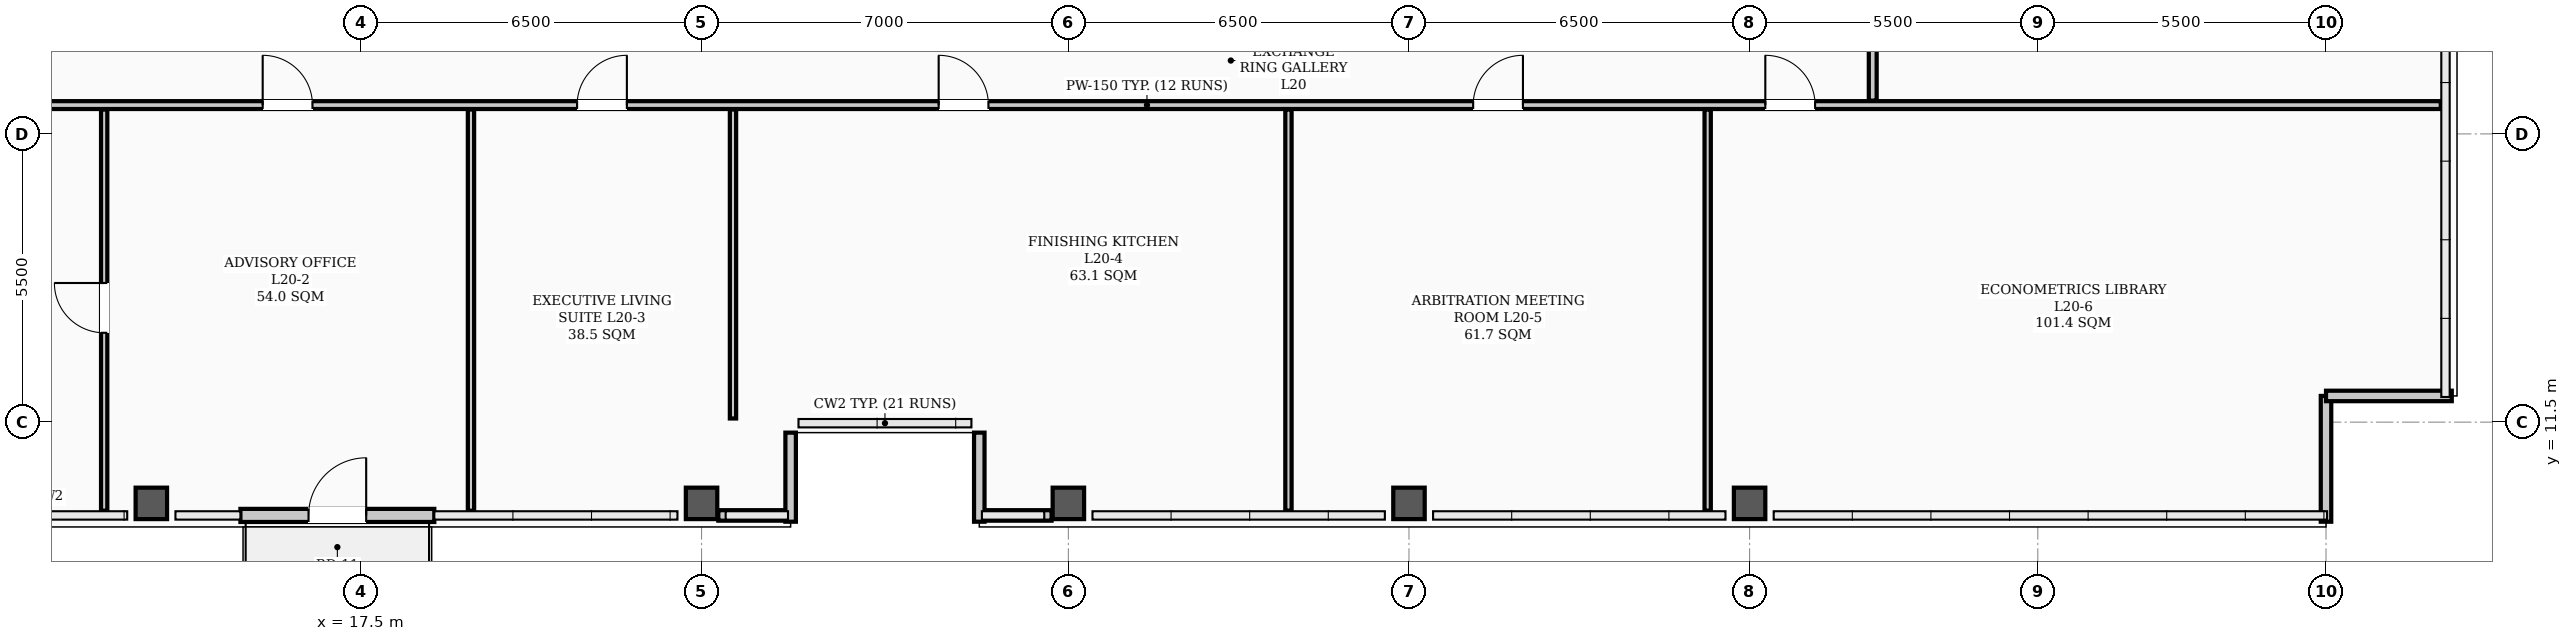
"""IFC4 building model, lengths in metres.
Left out: names, types, materials, properties, quantities, classifications, styles, units other than length and angle.
Written with IfcOpenShell. Run it as: python <this file> out.ifc"""

import sys

from ifc_helpers import new_model, si_unit, direction, frame, frame_2d, origin, origin_2d, place, context, subcontext, project, spatial, rectangle, hollow_rectangle, extrude, element, fill, save


model = new_model("IFC4")
c1 = context("Model", 3, precision=1e-05, world=origin(), true_north=direction((0.0, 1.0)))
c2 = subcontext(c1, "Body", "Model", "MODEL_VIEW")
j1 = project(units=[si_unit("LENGTHUNIT", "METRE"), si_unit("PLANEANGLEUNIT", "RADIAN")], contexts=[c1])
p1 = place(None, origin())
s1 = spatial("IfcSite", under=j1, at=p1, CompositionType="ELEMENT")
p2 = place(p1, origin())
s2 = spatial("IfcBuilding", under=s1, at=p2, CompositionType="ELEMENT")
p3 = place(p2, frame((0.0, 0.0, 81.1)))
s3 = spatial("IfcBuildingStorey", under=s2, at=p3, CompositionType="ELEMENT", Elevation=81.1)
for number, where, z_axis, x_axis in (
    (1, (13.5, 9.95, 0.0), (0.0, 0.0, 1.0), (1.0, 0.0, 0.0)),
    (2, (24.0, 9.95, 0.0), (0.0, 0.0, 1.0), (1.0, 0.0, 0.0)),
    (3, (31.0, 9.95, 0.0), (0.0, 0.0, 1.0), (1.0, 0.0, 0.0)),
    (4, (37.5, 9.95, 0.0), (0.0, 0.0, 1.0), (1.0, 0.0, 0.0)),
    (5, (44.0, 9.95, 0.0), (0.0, 0.0, 1.0), (1.0, 0.0, 0.0)),
):
    element("IfcColumn", number, at=place(p3, frame(where, z_axis=z_axis, x_axis=x_axis)), inside=s3, PredefinedType="COLUMN", context=c2, shape_type="SweptSolid", body=[
        extrude(hollow_rectangle(XDim=0.6, YDim=0.6, WallThickness=0.026, InnerFilletRadius=0.013, OuterFilletRadius=0.039, at=origin_2d()), origin(), (0.0, 0.0, 1.0), 3.9),
    ])
for number, where, z_axis, x_axis in (
    (6, (24.32, 9.72, 0.0), (0.0, 0.0, 1.0), (1.0, 0.0, 0.0)),
    (7, (29.35, 9.72, 0.0), (0.0, 0.0, 1.0), (1.0, 0.0, 0.0)),
):
    element("IfcWall", number, at=place(p3, frame(where, z_axis=z_axis, x_axis=x_axis)), inside=s3, PredefinedType="PARAPET", context=c2, shape_type="SweptSolid", body=[
        extrude(rectangle(XDim=1.33, YDim=0.2, at=frame_2d((0.665, 0.0))), origin(), (0.0, 0.0, 1.0), 1.2),
    ])
for number, where, z_axis, x_axis in (
    (8, (55.0, 9.6, 0.0), (0.0, 0.0, 1.0), (0.0, 1.0, 0.0)),
    (9, (55.0, 12.0, 0.0), (0.0, 0.0, 1.0), (1.0, 0.0, 0.0)),
):
    element("IfcWall", number, at=place(p3, frame(where, z_axis=z_axis, x_axis=x_axis)), inside=s3, PredefinedType="PARAPET", context=c2, shape_type="SweptSolid", body=[
        extrude(rectangle(XDim=2.4, YDim=0.2, at=frame_2d((1.2, 0.0))), origin(), (0.0, 0.0, 1.0), 1.2),
    ])
for number, where, z_axis, x_axis in (
    (10, (25.7, 9.6, 0.0), (0.0, 0.0, 1.0), (0.0, 1.0, 0.0)),
    (11, (29.3, 11.3, 0.0), (0.0, 0.0, 1.0), (0.0, -1.0, 0.0)),
):
    element("IfcWall", number, at=place(p3, frame(where, z_axis=z_axis, x_axis=x_axis)), inside=s3, PredefinedType="PARAPET", context=c2, shape_type="SweptSolid", body=[
        extrude(rectangle(XDim=1.7, YDim=0.2, at=frame_2d((0.85, 0.0))), origin(), (0.0, 0.0, 1.0), 1.2),
    ])
p4 = place(p3, frame((15.2, 9.72, 0.0), z_axis=(0.0, 0.0, 1.0), x_axis=(1.0, 0.0, 0.0)))
e12 = element("IfcWall", 12, at=p4, inside=s3, PredefinedType="STANDARD", context=c2, shape_type="SweptSolid", body=[
    extrude(rectangle(XDim=3.7, YDim=0.25, at=frame_2d((1.85, 0.0))), origin(), (0.0, 0.0, 1.0), 3.18),
])
p5 = place(p4, frame((1.3, 0.0, 0.0)))
e13 = element("IfcOpeningElement", 13, at=p5, cuts=e12, PredefinedType="OPENING", context=c2, shape_type="SweptSolid", body=[
    extrude(rectangle(XDim=1.1, YDim=2.2, at=frame_2d((0.55, 1.1))), frame((0.0, 0.135, 0.0), z_axis=(0.0, -1.0, 0.0), x_axis=(1.0, 0.0, 0.0)), (0.0, 0.0, 1.0), 0.27),
])
p6 = place(p3, frame((7.81, 17.55, 0.0), z_axis=(0.0, 0.0, 1.0), x_axis=(1.0, 0.0, 0.0)))
e14 = element("IfcWall", 14, at=p6, inside=s3, PredefinedType="PARTITIONING", context=c2, shape_type="SweptSolid", body=[
    extrude(rectangle(XDim=49.38, YDim=0.15, at=frame_2d((24.69, 0.0))), origin(), (0.0, 0.0, 1.0), 3.1),
])
p7 = place(p6, frame((7.815, 0.0, 0.0)))
e15 = element("IfcOpeningElement", 15, at=p7, cuts=e14, PredefinedType="OPENING", context=c2, shape_type="SweptSolid", body=[
    extrude(rectangle(XDim=0.95, YDim=2.08, at=frame_2d((0.475, 1.04))), frame((0.0, 0.085, 0.0), z_axis=(0.0, -1.0, 0.0), x_axis=(1.0, 0.0, 0.0)), (0.0, 0.0, 1.0), 0.17),
])
p8 = place(p6, frame((13.815, 0.0, 0.0)))
e16 = element("IfcOpeningElement", 16, at=p8, cuts=e14, PredefinedType="OPENING", context=c2, shape_type="SweptSolid", body=[
    extrude(rectangle(XDim=0.95, YDim=2.08, at=frame_2d((0.475, 1.04))), frame((0.0, 0.085, 0.0), z_axis=(0.0, -1.0, 0.0), x_axis=(1.0, 0.0, 0.0)), (0.0, 0.0, 1.0), 0.17),
])
p9 = place(p6, frame((20.715, 0.0, 0.0)))
e17 = element("IfcOpeningElement", 17, at=p9, cuts=e14, PredefinedType="OPENING", context=c2, shape_type="SweptSolid", body=[
    extrude(rectangle(XDim=0.95, YDim=2.08, at=frame_2d((0.475, 1.04))), frame((0.0, 0.085, 0.0), z_axis=(0.0, -1.0, 0.0), x_axis=(1.0, 0.0, 0.0)), (0.0, 0.0, 1.0), 0.17),
])
p10 = place(p6, frame((30.915, 0.0, 0.0)))
e18 = element("IfcOpeningElement", 18, at=p10, cuts=e14, PredefinedType="OPENING", context=c2, shape_type="SweptSolid", body=[
    extrude(rectangle(XDim=0.95, YDim=2.08, at=frame_2d((0.475, 1.04))), frame((0.0, 0.085, 0.0), z_axis=(0.0, -1.0, 0.0), x_axis=(1.0, 0.0, 0.0)), (0.0, 0.0, 1.0), 0.17),
])
p11 = place(p6, frame((36.49, 0.0, 0.0)))
e19 = element("IfcOpeningElement", 19, at=p11, cuts=e14, PredefinedType="OPENING", context=c2, shape_type="SweptSolid", body=[
    extrude(rectangle(XDim=0.95, YDim=2.08, at=frame_2d((0.475, 1.04))), frame((0.0, 0.085, 0.0), z_axis=(0.0, -1.0, 0.0), x_axis=(1.0, 0.0, 0.0)), (0.0, 0.0, 1.0), 0.17),
])
p12 = place(p3, frame((46.35, 17.635, 0.0), z_axis=(0.0, 0.0, 1.0), x_axis=(0.0, 1.0, 0.0)))
e20 = element("IfcWall", 20, at=p12, inside=s3, PredefinedType="PARTITIONING", context=c2, shape_type="SweptSolid", body=[
    extrude(rectangle(XDim=20.58, YDim=0.15, at=frame_2d((10.29, 0.0))), origin(), (0.0, 0.0, 1.0), 3.0),
])
p13 = place(p12, frame((3.865, 0.0, 0.0)))
e21 = element("IfcOpeningElement", 21, at=p13, cuts=e20, PredefinedType="OPENING", context=c2, shape_type="SweptSolid", body=[
    extrude(rectangle(XDim=0.95, YDim=2.08, at=frame_2d((0.475, 1.04))), frame((0.0, 0.085, 0.0), z_axis=(0.0, -1.0, 0.0), x_axis=(1.0, 0.0, 0.0)), (0.0, 0.0, 1.0), 0.17),
])
p14 = place(p12, frame((9.49, 0.0, 0.0)))
e22 = element("IfcOpeningElement", 22, at=p14, cuts=e20, PredefinedType="OPENING", context=c2, shape_type="SweptSolid", body=[
    extrude(rectangle(XDim=0.95, YDim=2.08, at=frame_2d((0.475, 1.04))), frame((0.0, 0.085, 0.0), z_axis=(0.0, -1.0, 0.0), x_axis=(1.0, 0.0, 0.0)), (0.0, 0.0, 1.0), 0.17),
])
p15 = place(p12, frame((17.44, 0.0, 0.0)))
e23 = element("IfcOpeningElement", 23, at=p15, cuts=e20, PredefinedType="OPENING", context=c2, shape_type="SweptSolid", body=[
    extrude(rectangle(XDim=0.95, YDim=2.08, at=frame_2d((0.475, 1.04))), frame((0.0, 0.085, 0.0), z_axis=(0.0, -1.0, 0.0), x_axis=(1.0, 0.0, 0.0)), (0.0, 0.0, 1.0), 0.17),
])
p16 = place(p3, frame((12.6, 9.81, 0.0), z_axis=(0.0, 0.0, 1.0), x_axis=(0.0, 1.0, 0.0)))
e24 = element("IfcWall", 24, at=p16, inside=s3, PredefinedType="PARTITIONING", context=c2, shape_type="SweptSolid", body=[
    extrude(rectangle(XDim=7.655, YDim=0.12, at=frame_2d((3.828, 0.0))), origin(), (0.0, 0.0, 1.0), 3.72),
])
p17 = place(p16, frame((3.395, 0.0, 0.0)))
e25 = element("IfcOpeningElement", 25, at=p17, cuts=e24, PredefinedType="OPENING", context=c2, shape_type="SweptSolid", body=[
    extrude(rectangle(XDim=0.95, YDim=2.08, at=frame_2d((0.475, 1.04))), frame((0.0, 0.07, 0.0), z_axis=(0.0, -1.0, 0.0), x_axis=(1.0, 0.0, 0.0)), (0.0, 0.0, 1.0), 0.14),
])
p18 = place(p3, frame((19.6, 9.81, 0.0), z_axis=(0.0, 0.0, 1.0), x_axis=(0.0, 1.0, 0.0)))
e26 = element("IfcWall", 26, at=p18, inside=s3, PredefinedType="PARTITIONING", context=c2, shape_type="SweptSolid", body=[
    extrude(rectangle(XDim=7.655, YDim=0.12, at=frame_2d((3.828, 0.0))), origin(), (0.0, 0.0, 1.0), 3.212),
])
p19 = place(p3, frame((24.6, 11.57, 0.0), z_axis=(0.0, 0.0, 1.0), x_axis=(0.0, 1.0, 0.0)))
e27 = element("IfcWall", 27, at=p19, inside=s3, PredefinedType="PARTITIONING", context=c2, shape_type="SweptSolid", body=[
    extrude(rectangle(XDim=5.895, YDim=0.12, at=frame_2d((2.948, 0.0))), origin(), (0.0, 0.0, 1.0), 3.1),
])
for number, where, z_axis, x_axis in (
    (28, (35.2, 9.81, 0.0), (0.0, 0.0, 1.0), (0.0, 1.0, 0.0)),
    (29, (43.2, 9.81, 0.0), (0.0, 0.0, 1.0), (0.0, 1.0, 0.0)),
):
    element("IfcWall", number, at=place(p3, frame(where, z_axis=z_axis, x_axis=x_axis)), inside=s3, PredefinedType="PARTITIONING", context=c2, shape_type="SweptSolid", body=[
        extrude(rectangle(XDim=7.655, YDim=0.12, at=frame_2d((3.828, 0.0))), origin(), (0.0, 0.0, 1.0), 3.212),
    ])
p20 = place(p5, origin())
e30 = element("IfcDoor", 30, at=p20, inside=s3, OperationType="SINGLE_SWING_RIGHT", PredefinedType="DOOR", context=c2, shape_type="SweptSolid", body=[
    extrude(rectangle(XDim=1.1, YDim=2.2, at=frame_2d((0.55, 1.1))), frame((0.0, 0.025, 0.0), z_axis=(0.0, -1.0, 0.0), x_axis=(1.0, 0.0, 0.0)), (0.0, 0.0, 1.0), 0.05),
])
fill(e13, e30)
p21 = place(p17, origin())
e31 = element("IfcDoor", 31, at=p21, inside=s3, OperationType="SINGLE_SWING_RIGHT", PredefinedType="DOOR", context=c2, shape_type="SweptSolid", body=[
    extrude(rectangle(XDim=0.95, YDim=2.08, at=frame_2d((0.475, 1.04))), frame((0.0, 0.025, 0.0), z_axis=(0.0, -1.0, 0.0), x_axis=(1.0, 0.0, 0.0)), (0.0, 0.0, 1.0), 0.05),
])
fill(e25, e31)
p22 = place(p7, origin())
e32 = element("IfcDoor", 32, at=p22, inside=s3, OperationType="SINGLE_SWING_LEFT", PredefinedType="DOOR", context=c2, shape_type="SweptSolid", body=[
    extrude(rectangle(XDim=0.95, YDim=2.08, at=frame_2d((0.475, 1.04))), frame((0.0, 0.025, 0.0), z_axis=(0.0, -1.0, 0.0), x_axis=(1.0, 0.0, 0.0)), (0.0, 0.0, 1.0), 0.05),
])
fill(e15, e32)
p23 = place(p8, origin())
e33 = element("IfcDoor", 33, at=p23, inside=s3, OperationType="SINGLE_SWING_RIGHT", PredefinedType="DOOR", context=c2, shape_type="SweptSolid", body=[
    extrude(rectangle(XDim=0.95, YDim=2.08, at=frame_2d((0.475, 1.04))), frame((0.0, 0.025, 0.0), z_axis=(0.0, -1.0, 0.0), x_axis=(1.0, 0.0, 0.0)), (0.0, 0.0, 1.0), 0.05),
])
fill(e16, e33)
p24 = place(p9, origin())
e34 = element("IfcDoor", 34, at=p24, inside=s3, OperationType="SINGLE_SWING_LEFT", PredefinedType="DOOR", context=c2, shape_type="SweptSolid", body=[
    extrude(rectangle(XDim=0.95, YDim=2.08, at=frame_2d((0.475, 1.04))), frame((0.0, 0.025, 0.0), z_axis=(0.0, -1.0, 0.0), x_axis=(1.0, 0.0, 0.0)), (0.0, 0.0, 1.0), 0.05),
])
fill(e17, e34)
p25 = place(p10, origin())
e35 = element("IfcDoor", 35, at=p25, inside=s3, OperationType="SINGLE_SWING_RIGHT", PredefinedType="DOOR", context=c2, shape_type="SweptSolid", body=[
    extrude(rectangle(XDim=0.95, YDim=2.08, at=frame_2d((0.475, 1.04))), frame((0.0, 0.025, 0.0), z_axis=(0.0, -1.0, 0.0), x_axis=(1.0, 0.0, 0.0)), (0.0, 0.0, 1.0), 0.05),
])
fill(e18, e35)
p26 = place(p11, origin())
e36 = element("IfcDoor", 36, at=p26, inside=s3, OperationType="SINGLE_SWING_LEFT", PredefinedType="DOOR", context=c2, shape_type="SweptSolid", body=[
    extrude(rectangle(XDim=0.95, YDim=2.08, at=frame_2d((0.475, 1.04))), frame((0.0, 0.025, 0.0), z_axis=(0.0, -1.0, 0.0), x_axis=(1.0, 0.0, 0.0)), (0.0, 0.0, 1.0), 0.05),
])
fill(e19, e36)
save(model, sys.argv[1])
